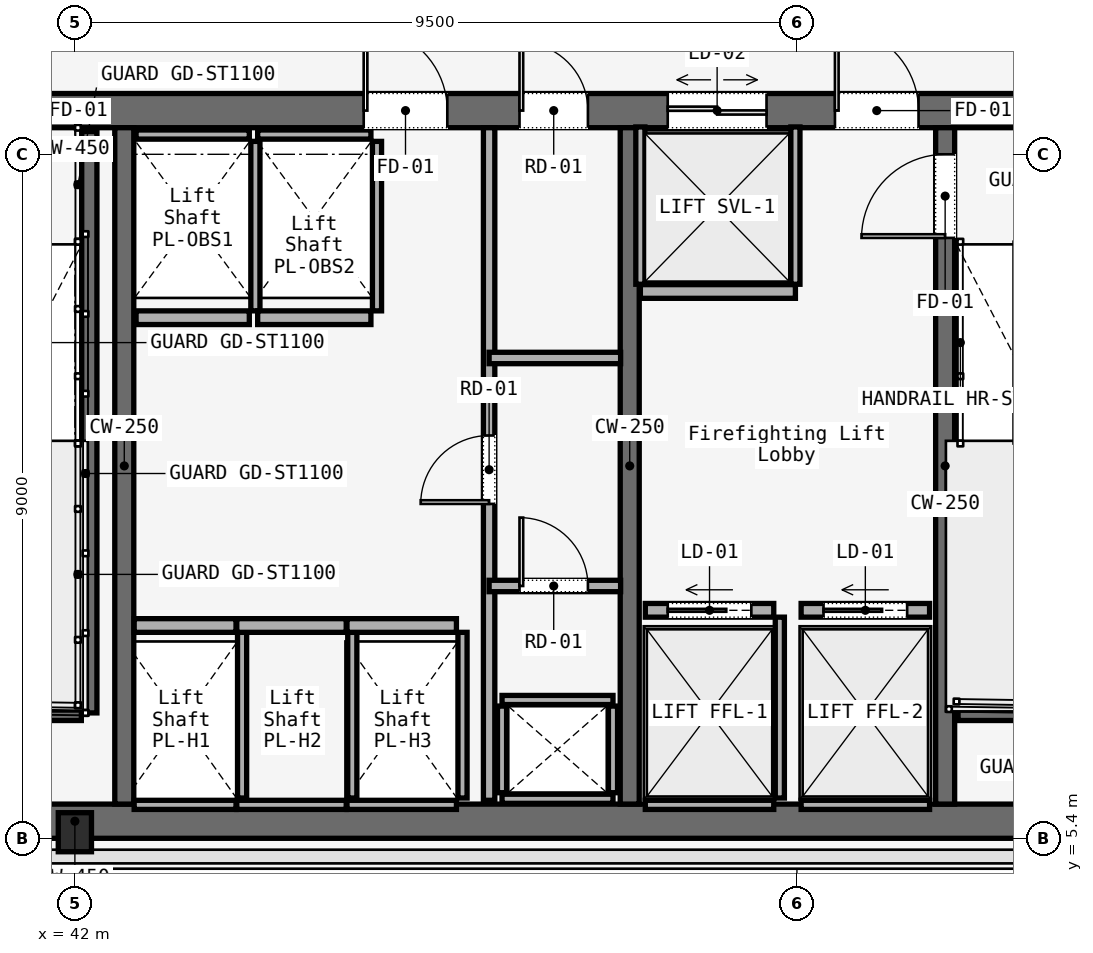
"""IFC4 building model, lengths in metres.
Left out: names, types, materials, properties, quantities, classifications, styles, units other than length and angle.
Written with IfcOpenShell. Run it as: python <this file> out.ifc"""

import sys

from ifc_helpers import new_model, si_unit, direction, frame, frame_2d, origin, origin_2d, place, context, subcontext, project, spatial, rectangle, i_section, extrude, element, fill, save


model = new_model("IFC4")
c1 = context("Model", 3, precision=1e-05, world=origin(), true_north=direction((0.0, 1.0)))
c2 = subcontext(c1, "Body", "Model", "MODEL_VIEW")
j1 = project(units=[si_unit("LENGTHUNIT", "METRE"), si_unit("PLANEANGLEUNIT", "RADIAN")], contexts=[c1])
p1 = place(None, origin())
s1 = spatial("IfcSite", under=j1, at=p1, CompositionType="ELEMENT")
p2 = place(p1, origin())
s2 = spatial("IfcBuilding", under=s1, at=p2, CompositionType="ELEMENT")
p3 = place(p2, frame((0.0, 0.0, 85.4)))
s3 = spatial("IfcBuildingStorey", under=s2, at=p3, CompositionType="ELEMENT", Elevation=85.4)
p4 = place(p3, frame((26.45, 14.975, 0.0), z_axis=(0.0, 0.0, 1.0), x_axis=(1.0, 0.0, 0.0)))
e1 = element("IfcWall", 1, at=p4, inside=s3, PredefinedType="SOLIDWALL", context=c2, shape_type="SweptSolid", body=[
    extrude(rectangle(XDim=31.1, YDim=0.45, at=frame_2d((15.55, 0.0))), origin(), (0.0, 0.0, 1.0), 3.58),
])
p5 = place(p4, frame((1.65, 0.0, 0.0)))
e2 = element("IfcOpeningElement", 2, at=p5, cuts=e1, PredefinedType="OPENING", context=c2, shape_type="SweptSolid", body=[
    extrude(rectangle(XDim=1.1, YDim=2.2, at=frame_2d((0.55, 1.1))), frame((0.0, 0.225, 0.0), z_axis=(0.0, -1.0, 0.0), x_axis=(1.0, 0.0, 0.0)), (0.0, 0.0, 1.0), 0.45),
])
p6 = place(p4, frame((13.65, 0.0, 0.0)))
e3 = element("IfcOpeningElement", 3, at=p6, cuts=e1, PredefinedType="OPENING", context=c2, shape_type="SweptSolid", body=[
    extrude(rectangle(XDim=1.1, YDim=2.2, at=frame_2d((0.55, 1.1))), frame((0.0, 0.225, 0.0), z_axis=(0.0, -1.0, 0.0), x_axis=(1.0, 0.0, 0.0)), (0.0, 0.0, 1.0), 0.45),
])
p7 = place(p4, frame((25.55, 0.0, 0.0)))
e4 = element("IfcOpeningElement", 4, at=p7, cuts=e1, PredefinedType="OPENING", context=c2, shape_type="SweptSolid", body=[
    extrude(rectangle(XDim=1.1, YDim=2.2, at=frame_2d((0.55, 1.1))), frame((0.0, 0.225, 0.0), z_axis=(0.0, -1.0, 0.0), x_axis=(1.0, 0.0, 0.0)), (0.0, 0.0, 1.0), 0.45),
])
p8 = place(p4, frame((10.7, 0.0, 0.0)))
e5 = element("IfcOpeningElement", 5, at=p8, cuts=e1, PredefinedType="OPENING", context=c2, shape_type="SweptSolid", body=[
    extrude(rectangle(XDim=1.4, YDim=2.2, at=frame_2d((0.7, 1.1))), frame((0.0, 0.225, 0.0), z_axis=(0.0, -1.0, 0.0), x_axis=(1.0, 0.0, 0.0)), (0.0, 0.0, 1.0), 0.45),
])
p9 = place(p4, frame((19.35, 0.0, 0.0)))
e6 = element("IfcOpeningElement", 6, at=p9, cuts=e1, PredefinedType="OPENING", context=c2, shape_type="SweptSolid", body=[
    extrude(rectangle(XDim=1.1, YDim=2.2, at=frame_2d((0.55, 1.1))), frame((0.0, 0.225, 0.0), z_axis=(0.0, -1.0, 0.0), x_axis=(1.0, 0.0, 0.0)), (0.0, 0.0, 1.0), 0.45),
])
p10 = place(p4, frame((21.4, 0.0, 0.0)))
e7 = element("IfcOpeningElement", 7, at=p10, cuts=e1, PredefinedType="OPENING", context=c2, shape_type="SweptSolid", body=[
    extrude(rectangle(XDim=0.9, YDim=2.1, at=frame_2d((0.45, 1.05))), frame((0.0, 0.225, 0.0), z_axis=(0.0, -1.0, 0.0), x_axis=(1.0, 0.0, 0.0)), (0.0, 0.0, 1.0), 0.45),
])
p11 = place(p4, frame((23.35, 0.0, 0.0)))
e8 = element("IfcOpeningElement", 8, at=p11, cuts=e1, PredefinedType="OPENING", context=c2, shape_type="SweptSolid", body=[
    extrude(rectangle(XDim=1.3, YDim=2.3, at=frame_2d((0.65, 1.15))), frame((0.0, 0.225, 0.0), z_axis=(0.0, -1.0, 0.0), x_axis=(1.0, 0.0, 0.0)), (0.0, 0.0, 1.0), 0.45),
])
p12 = place(p3, frame((26.45, 5.625, 0.0), z_axis=(0.0, 0.0, 1.0), x_axis=(1.0, 0.0, 0.0)))
e9 = element("IfcWall", 9, at=p12, inside=s3, PredefinedType="SOLIDWALL", context=c2, shape_type="SweptSolid", body=[
    extrude(rectangle(XDim=31.1, YDim=0.45, at=frame_2d((15.55, 0.0))), origin(), (0.0, 0.0, 1.0), 3.58),
])
for number, where, z_axis, x_axis in (
    (10, (42.65, 5.85, 0.0), (0.0, 0.0, 1.0), (0.0, 1.0, 0.0)),
    (11, (49.3, 5.85, 0.0), (0.0, 0.0, 1.0), (0.0, 1.0, 0.0)),
):
    element("IfcWall", number, at=place(p3, frame(where, z_axis=z_axis, x_axis=x_axis)), inside=s3, PredefinedType="SOLIDWALL", context=c2, shape_type="SweptSolid", body=[
        extrude(rectangle(XDim=8.9, YDim=0.25, at=frame_2d((4.45, 0.0))), origin(), (0.0, 0.0, 1.0), 3.58),
    ])
p13 = place(p3, frame((53.45, 5.85, 0.0), z_axis=(0.0, 0.0, 1.0), x_axis=(0.0, 1.0, 0.0)))
e12 = element("IfcWall", 12, at=p13, inside=s3, PredefinedType="SOLIDWALL", context=c2, shape_type="SweptSolid", body=[
    extrude(rectangle(XDim=8.9, YDim=0.25, at=frame_2d((4.45, 0.0))), origin(), (0.0, 0.0, 1.0), 3.58),
])
p14 = place(p13, frame((7.45, 0.0, 0.0)))
e13 = element("IfcOpeningElement", 13, at=p14, cuts=e12, PredefinedType="OPENING", context=c2, shape_type="SweptSolid", body=[
    extrude(rectangle(XDim=1.1, YDim=2.2, at=frame_2d((0.55, 1.1))), frame((0.0, 0.125, 0.0), z_axis=(0.0, -1.0, 0.0), x_axis=(1.0, 0.0, 0.0)), (0.0, 0.0, 1.0), 0.25),
])
p15 = place(p3, frame((42.0, 5.48, 0.0), z_axis=(0.0, 0.0, 1.0), x_axis=(1.0, 0.0, 0.0)))
e14 = element("IfcColumn", 14, at=p15, inside=s3, PredefinedType="COLUMN", context=c2, shape_type="SweptSolid", body=[
    extrude(i_section(OverallWidth=0.437, OverallDepth=0.514, WebThickness=0.061, FlangeThickness=0.077, FilletRadius=0.015, at=origin_2d()), origin(), (0.0, 0.0, 1.0), 3.58),
])
p16 = place(p3, frame((42.19, 14.7, 0.0), z_axis=(0.0, 0.0, 1.0), x_axis=(0.0, -1.0, 0.0)))
e15 = element("IfcWall", 15, at=p16, inside=s3, PredefinedType="SOLIDWALL", context=c2, shape_type="SweptSolid", body=[
    extrude(rectangle(XDim=7.65, YDim=0.2, at=frame_2d((3.825, 0.0))), origin(), (0.0, 0.0, 1.0), 3.8),
])
for number, where, z_axis, x_axis in (
    (16, (38.97, 7.05, 0.0), (0.0, 0.0, 1.0), (1.0, 0.0, 0.0)),
    (17, (53.62, 7.05, 0.0), (0.0, 0.0, 1.0), (1.0, 0.0, 0.0)),
):
    element("IfcWall", number, at=place(p3, frame(where, z_axis=z_axis, x_axis=x_axis)), inside=s3, PredefinedType="SOLIDWALL", context=c2, shape_type="SweptSolid", body=[
        extrude(rectangle(XDim=3.115, YDim=0.2, at=frame_2d((1.558, 0.0))), origin(), (0.0, 0.0, 1.0), 3.8),
    ])
for number, where, z_axis, x_axis in (
    (18, (47.62, 5.92, 0.0), (0.0, 0.0, 1.0), (1.0, 0.0, 0.0)),
    (19, (47.62, 7.22, 0.0), (0.0, 0.0, 1.0), (1.0, 0.0, 0.0)),
):
    element("IfcWall", number, at=place(p3, frame(where, z_axis=z_axis, x_axis=x_axis)), inside=s3, PredefinedType="SOLIDWALL", context=c2, shape_type="SweptSolid", body=[
        extrude(rectangle(XDim=1.46, YDim=0.12, at=frame_2d((0.73, 0.0))), origin(), (0.0, 0.0, 1.0), 2.95),
    ])
for number, where, z_axis, x_axis in (
    (20, (47.62, 6.0, 0.0), (0.0, 0.0, 1.0), (0.0, 1.0, 0.0)),
    (21, (49.08, 6.0, 0.0), (0.0, 0.0, 1.0), (0.0, 1.0, 0.0)),
):
    element("IfcWall", number, at=place(p3, frame(where, z_axis=z_axis, x_axis=x_axis)), inside=s3, PredefinedType="SOLIDWALL", context=c2, shape_type="SweptSolid", body=[
        extrude(rectangle(XDim=1.14, YDim=0.12, at=frame_2d((0.57, 0.0))), origin(), (0.0, 0.0, 1.0), 2.95),
    ])
p17 = place(p3, frame((47.45, 5.9, 0.0), z_axis=(0.0, 0.0, 1.0), x_axis=(0.0, 1.0, 0.0)))
e22 = element("IfcWall", 22, at=p17, inside=s3, PredefinedType="PARTITIONING", context=c2, shape_type="SweptSolid", body=[
    extrude(rectangle(XDim=8.85, YDim=0.15, at=frame_2d((4.425, 0.0))), origin(), (0.0, 0.0, 1.0), 2.95),
])
p18 = place(p17, frame((3.9, 0.0, 0.0)))
e23 = element("IfcOpeningElement", 23, at=p18, cuts=e22, PredefinedType="OPENING", context=c2, shape_type="SweptSolid", body=[
    extrude(rectangle(XDim=0.9, YDim=2.1, at=frame_2d((0.45, 1.05))), frame((0.0, 0.075, 0.0), z_axis=(0.0, -1.0, 0.0), x_axis=(1.0, 0.0, 0.0)), (0.0, 0.0, 1.0), 0.15),
])
p19 = place(p3, frame((47.45, 8.72, 0.0), z_axis=(0.0, 0.0, 1.0), x_axis=(1.0, 0.0, 0.0)))
e24 = element("IfcWall", 24, at=p19, inside=s3, PredefinedType="PARTITIONING", context=c2, shape_type="SweptSolid", body=[
    extrude(rectangle(XDim=1.73, YDim=0.15, at=frame_2d((0.865, 0.0))), origin(), (0.0, 0.0, 1.0), 2.95),
])
p20 = place(p19, frame((0.4, 0.0, 0.0)))
e25 = element("IfcOpeningElement", 25, at=p20, cuts=e24, PredefinedType="OPENING", context=c2, shape_type="SweptSolid", body=[
    extrude(rectangle(XDim=0.9, YDim=2.1, at=frame_2d((0.45, 1.05))), frame((0.0, 0.075, 0.0), z_axis=(0.0, -1.0, 0.0), x_axis=(1.0, 0.0, 0.0)), (0.0, 0.0, 1.0), 0.15),
])
p21 = place(p3, frame((47.45, 11.72, 0.0), z_axis=(0.0, 0.0, 1.0), x_axis=(1.0, 0.0, 0.0)))
e26 = element("IfcWall", 26, at=p21, inside=s3, PredefinedType="PARTITIONING", context=c2, shape_type="SweptSolid", body=[
    extrude(rectangle(XDim=1.73, YDim=0.15, at=frame_2d((0.865, 0.0))), origin(), (0.0, 0.0, 1.0), 2.95),
])
p22 = place(p3, frame((42.78, 8.2, 0.0), z_axis=(0.0, 0.0, 1.0), x_axis=(1.0, 0.0, 0.0)))
e27 = element("IfcWall", 27, at=p22, inside=s3, PredefinedType="SOLIDWALL", context=c2, shape_type="SweptSolid", body=[
    extrude(rectangle(XDim=1.34, YDim=0.18, at=frame_2d((0.67, 0.0))), origin(), (0.0, 0.0, 1.0), 2.95),
])
p23 = place(p3, frame((42.78, 5.84, 0.0), z_axis=(0.0, 0.0, 1.0), x_axis=(1.0, 0.0, 0.0)))
e28 = element("IfcWall", 28, at=p23, inside=s3, PredefinedType="SOLIDWALL", context=c2, shape_type="SweptSolid", body=[
    extrude(rectangle(XDim=1.34, YDim=0.12, at=frame_2d((0.67, 0.0))), origin(), (0.0, 0.0, 1.0), 2.95),
])
p24 = place(p3, frame((44.2, 5.93, 0.0), z_axis=(0.0, 0.0, 1.0), x_axis=(0.0, 1.0, 0.0)))
e29 = element("IfcWall", 29, at=p24, inside=s3, PredefinedType="SOLIDWALL", context=c2, shape_type="SweptSolid", body=[
    extrude(rectangle(XDim=2.18, YDim=0.12, at=frame_2d((1.09, 0.0))), origin(), (0.0, 0.0, 1.0), 2.95),
])
p25 = place(p3, frame((44.13, 8.2, 0.0), z_axis=(0.0, 0.0, 1.0), x_axis=(1.0, 0.0, 0.0)))
e30 = element("IfcWall", 30, at=p25, inside=s3, PredefinedType="SOLIDWALL", context=c2, shape_type="SweptSolid", body=[
    extrude(rectangle(XDim=1.44, YDim=0.18, at=frame_2d((0.72, 0.0))), origin(), (0.0, 0.0, 1.0), 2.95),
])
p26 = place(p3, frame((44.13, 5.84, 0.0), z_axis=(0.0, 0.0, 1.0), x_axis=(1.0, 0.0, 0.0)))
e31 = element("IfcWall", 31, at=p26, inside=s3, PredefinedType="SOLIDWALL", context=c2, shape_type="SweptSolid", body=[
    extrude(rectangle(XDim=1.44, YDim=0.12, at=frame_2d((0.72, 0.0))), origin(), (0.0, 0.0, 1.0), 2.95),
])
p27 = place(p3, frame((45.65, 5.93, 0.0), z_axis=(0.0, 0.0, 1.0), x_axis=(0.0, 1.0, 0.0)))
e32 = element("IfcWall", 32, at=p27, inside=s3, PredefinedType="SOLIDWALL", context=c2, shape_type="SweptSolid", body=[
    extrude(rectangle(XDim=2.18, YDim=0.12, at=frame_2d((1.09, 0.0))), origin(), (0.0, 0.0, 1.0), 2.95),
])
p28 = place(p3, frame((45.58, 8.2, 0.0), z_axis=(0.0, 0.0, 1.0), x_axis=(1.0, 0.0, 0.0)))
e33 = element("IfcWall", 33, at=p28, inside=s3, PredefinedType="SOLIDWALL", context=c2, shape_type="SweptSolid", body=[
    extrude(rectangle(XDim=1.44, YDim=0.18, at=frame_2d((0.72, 0.0))), origin(), (0.0, 0.0, 1.0), 2.95),
])
p29 = place(p3, frame((45.58, 5.84, 0.0), z_axis=(0.0, 0.0, 1.0), x_axis=(1.0, 0.0, 0.0)))
e34 = element("IfcWall", 34, at=p29, inside=s3, PredefinedType="SOLIDWALL", context=c2, shape_type="SweptSolid", body=[
    extrude(rectangle(XDim=1.44, YDim=0.12, at=frame_2d((0.72, 0.0))), origin(), (0.0, 0.0, 1.0), 2.95),
])
p30 = place(p3, frame((47.1, 5.93, 0.0), z_axis=(0.0, 0.0, 1.0), x_axis=(0.0, 1.0, 0.0)))
e35 = element("IfcWall", 35, at=p30, inside=s3, PredefinedType="SOLIDWALL", context=c2, shape_type="SweptSolid", body=[
    extrude(rectangle(XDim=2.18, YDim=0.12, at=frame_2d((1.09, 0.0))), origin(), (0.0, 0.0, 1.0), 2.95),
])
p31 = place(p3, frame((42.805, 12.25, 0.0), z_axis=(0.0, 0.0, 1.0), x_axis=(1.0, 0.0, 0.0)))
e36 = element("IfcWall", 36, at=p31, inside=s3, PredefinedType="SOLIDWALL", context=c2, shape_type="SweptSolid", body=[
    extrude(rectangle(XDim=1.49, YDim=0.18, at=frame_2d((0.745, 0.0))), origin(), (0.0, 0.0, 1.0), 2.95),
])
p32 = place(p3, frame((42.805, 14.66, 0.0), z_axis=(0.0, 0.0, 1.0), x_axis=(1.0, 0.0, 0.0)))
e37 = element("IfcWall", 37, at=p32, inside=s3, PredefinedType="SOLIDWALL", context=c2, shape_type="SweptSolid", body=[
    extrude(rectangle(XDim=1.49, YDim=0.12, at=frame_2d((0.745, 0.0))), origin(), (0.0, 0.0, 1.0), 2.95),
])
p33 = place(p3, frame((44.375, 12.34, 0.0), z_axis=(0.0, 0.0, 1.0), x_axis=(0.0, 1.0, 0.0)))
e38 = element("IfcWall", 38, at=p33, inside=s3, PredefinedType="SOLIDWALL", context=c2, shape_type="SweptSolid", body=[
    extrude(rectangle(XDim=2.23, YDim=0.12, at=frame_2d((1.115, 0.0))), origin(), (0.0, 0.0, 1.0), 2.95),
])
p34 = place(p3, frame((44.405, 12.25, 0.0), z_axis=(0.0, 0.0, 1.0), x_axis=(1.0, 0.0, 0.0)))
e39 = element("IfcWall", 39, at=p34, inside=s3, PredefinedType="SOLIDWALL", context=c2, shape_type="SweptSolid", body=[
    extrude(rectangle(XDim=1.49, YDim=0.18, at=frame_2d((0.745, 0.0))), origin(), (0.0, 0.0, 1.0), 2.95),
])
p35 = place(p3, frame((44.405, 14.66, 0.0), z_axis=(0.0, 0.0, 1.0), x_axis=(1.0, 0.0, 0.0)))
e40 = element("IfcWall", 40, at=p35, inside=s3, PredefinedType="SOLIDWALL", context=c2, shape_type="SweptSolid", body=[
    extrude(rectangle(XDim=1.49, YDim=0.12, at=frame_2d((0.745, 0.0))), origin(), (0.0, 0.0, 1.0), 2.95),
])
p36 = place(p3, frame((45.975, 12.34, 0.0), z_axis=(0.0, 0.0, 1.0), x_axis=(0.0, 1.0, 0.0)))
e41 = element("IfcWall", 41, at=p36, inside=s3, PredefinedType="SOLIDWALL", context=c2, shape_type="SweptSolid", body=[
    extrude(rectangle(XDim=2.23, YDim=0.12, at=frame_2d((1.115, 0.0))), origin(), (0.0, 0.0, 1.0), 2.95),
])
p37 = place(p3, frame((49.505, 8.4, 0.0), z_axis=(0.0, 0.0, 1.0), x_axis=(1.0, 0.0, 0.0)))
e42 = element("IfcWall", 42, at=p37, inside=s3, PredefinedType="SOLIDWALL", context=c2, shape_type="SweptSolid", body=[
    extrude(rectangle(XDim=1.69, YDim=0.18, at=frame_2d((0.845, 0.0))), origin(), (0.0, 0.0, 1.0), 2.95),
])
p38 = place(p37, frame((0.295, 0.0, 0.0)))
e43 = element("IfcOpeningElement", 43, at=p38, cuts=e42, PredefinedType="OPENING", context=c2, shape_type="SweptSolid", body=[
    extrude(rectangle(XDim=1.1, YDim=2.2, at=frame_2d((0.55, 1.1))), frame((0.0, 0.09, 0.0), z_axis=(0.0, -1.0, 0.0), x_axis=(1.0, 0.0, 0.0)), (0.0, 0.0, 1.0), 0.18),
])
p39 = place(p3, frame((49.505, 5.84, 0.0), z_axis=(0.0, 0.0, 1.0), x_axis=(1.0, 0.0, 0.0)))
e44 = element("IfcWall", 44, at=p39, inside=s3, PredefinedType="SOLIDWALL", context=c2, shape_type="SweptSolid", body=[
    extrude(rectangle(XDim=1.69, YDim=0.12, at=frame_2d((0.845, 0.0))), origin(), (0.0, 0.0, 1.0), 2.95),
])
p40 = place(p3, frame((51.275, 5.93, 0.0), z_axis=(0.0, 0.0, 1.0), x_axis=(0.0, 1.0, 0.0)))
e45 = element("IfcWall", 45, at=p40, inside=s3, PredefinedType="SOLIDWALL", context=c2, shape_type="SweptSolid", body=[
    extrude(rectangle(XDim=2.38, YDim=0.12, at=frame_2d((1.19, 0.0))), origin(), (0.0, 0.0, 1.0), 2.95),
])
p41 = place(p3, frame((51.555, 8.4, 0.0), z_axis=(0.0, 0.0, 1.0), x_axis=(1.0, 0.0, 0.0)))
e46 = element("IfcWall", 46, at=p41, inside=s3, PredefinedType="SOLIDWALL", context=c2, shape_type="SweptSolid", body=[
    extrude(rectangle(XDim=1.69, YDim=0.18, at=frame_2d((0.845, 0.0))), origin(), (0.0, 0.0, 1.0), 2.95),
])
p42 = place(p41, frame((0.295, 0.0, 0.0)))
e47 = element("IfcOpeningElement", 47, at=p42, cuts=e46, PredefinedType="OPENING", context=c2, shape_type="SweptSolid", body=[
    extrude(rectangle(XDim=1.1, YDim=2.2, at=frame_2d((0.55, 1.1))), frame((0.0, 0.09, 0.0), z_axis=(0.0, -1.0, 0.0), x_axis=(1.0, 0.0, 0.0)), (0.0, 0.0, 1.0), 0.18),
])
p43 = place(p3, frame((51.555, 5.84, 0.0), z_axis=(0.0, 0.0, 1.0), x_axis=(1.0, 0.0, 0.0)))
e48 = element("IfcWall", 48, at=p43, inside=s3, PredefinedType="SOLIDWALL", context=c2, shape_type="SweptSolid", body=[
    extrude(rectangle(XDim=1.69, YDim=0.12, at=frame_2d((0.845, 0.0))), origin(), (0.0, 0.0, 1.0), 2.95),
])
p44 = place(p3, frame((49.44, 12.595, 0.0), z_axis=(0.0, 0.0, 1.0), x_axis=(1.0, 0.0, 0.0)))
e49 = element("IfcWall", 49, at=p44, inside=s3, PredefinedType="SOLIDWALL", context=c2, shape_type="SweptSolid", body=[
    extrude(rectangle(XDim=2.04, YDim=0.18, at=frame_2d((1.02, 0.0))), origin(), (0.0, 0.0, 1.0), 2.95),
])
for number, where, z_axis, x_axis in (
    (50, (49.44, 12.69, 0.0), (0.0, 0.0, 1.0), (0.0, 1.0, 0.0)),
    (51, (51.48, 12.69, 0.0), (0.0, 0.0, 1.0), (0.0, 1.0, 0.0)),
):
    element("IfcWall", number, at=place(p3, frame(where, z_axis=z_axis, x_axis=x_axis)), inside=s3, PredefinedType="SOLIDWALL", context=c2, shape_type="SweptSolid", body=[
        extrude(rectangle(XDim=2.07, YDim=0.12, at=frame_2d((1.035, 0.0))), origin(), (0.0, 0.0, 1.0), 2.95),
    ])
p45 = place(p7, origin())
e52 = element("IfcDoor", 52, at=p45, inside=s3, OperationType="SINGLE_SWING_RIGHT", PredefinedType="DOOR", context=c2, shape_type="SweptSolid", body=[
    extrude(rectangle(XDim=1.1, YDim=2.2, at=frame_2d((0.55, 1.1))), frame((0.0, 0.025, 0.0), z_axis=(0.0, -1.0, 0.0), x_axis=(1.0, 0.0, 0.0)), (0.0, 0.0, 1.0), 0.05),
])
fill(e4, e52)
p46 = place(p9, origin())
e53 = element("IfcDoor", 53, at=p46, inside=s3, OperationType="SINGLE_SWING_LEFT", PredefinedType="DOOR", context=c2, shape_type="SweptSolid", body=[
    extrude(rectangle(XDim=1.1, YDim=2.2, at=frame_2d((0.55, 1.1))), frame((0.0, 0.025, 0.0), z_axis=(0.0, -1.0, 0.0), x_axis=(1.0, 0.0, 0.0)), (0.0, 0.0, 1.0), 0.05),
])
fill(e6, e53)
p47 = place(p10, origin())
e54 = element("IfcDoor", 54, at=p47, inside=s3, OperationType="SINGLE_SWING_LEFT", PredefinedType="DOOR", context=c2, shape_type="SweptSolid", body=[
    extrude(rectangle(XDim=0.9, YDim=2.1, at=frame_2d((0.45, 1.05))), frame((0.0, 0.025, 0.0), z_axis=(0.0, -1.0, 0.0), x_axis=(1.0, 0.0, 0.0)), (0.0, 0.0, 1.0), 0.05),
])
fill(e7, e54)
p48 = place(p14, origin())
e55 = element("IfcDoor", 55, at=p48, inside=s3, OperationType="SINGLE_SWING_LEFT", PredefinedType="DOOR", context=c2, shape_type="SweptSolid", body=[
    extrude(rectangle(XDim=1.1, YDim=2.2, at=frame_2d((0.55, 1.1))), frame((0.0, 0.025, 0.0), z_axis=(0.0, -1.0, 0.0), x_axis=(1.0, 0.0, 0.0)), (0.0, 0.0, 1.0), 0.05),
])
fill(e13, e55)
p49 = place(p18, origin())
e56 = element("IfcDoor", 56, at=p49, inside=s3, OperationType="SINGLE_SWING_LEFT", PredefinedType="DOOR", context=c2, shape_type="SweptSolid", body=[
    extrude(rectangle(XDim=0.9, YDim=2.1, at=frame_2d((0.45, 1.05))), frame((0.0, 0.025, 0.0), z_axis=(0.0, -1.0, 0.0), x_axis=(1.0, 0.0, 0.0)), (0.0, 0.0, 1.0), 0.05),
])
fill(e23, e56)
p50 = place(p20, origin())
e57 = element("IfcDoor", 57, at=p50, inside=s3, OperationType="SINGLE_SWING_RIGHT", PredefinedType="DOOR", context=c2, shape_type="SweptSolid", body=[
    extrude(rectangle(XDim=0.9, YDim=2.1, at=frame_2d((0.45, 1.05))), frame((0.0, 0.025, 0.0), z_axis=(0.0, -1.0, 0.0), x_axis=(1.0, 0.0, 0.0)), (0.0, 0.0, 1.0), 0.05),
])
fill(e25, e57)
p51 = place(p38, origin())
e58 = element("IfcDoor", 58, at=p51, inside=s3, OperationType="SLIDING_TO_LEFT", PredefinedType="DOOR", context=c2, shape_type="SweptSolid", body=[
    extrude(rectangle(XDim=1.1, YDim=2.2, at=frame_2d((0.55, 1.1))), frame((0.0, 0.025, 0.0), z_axis=(0.0, -1.0, 0.0), x_axis=(1.0, 0.0, 0.0)), (0.0, 0.0, 1.0), 0.05),
])
fill(e43, e58)
p52 = place(p42, origin())
e59 = element("IfcDoor", 59, at=p52, inside=s3, OperationType="SLIDING_TO_LEFT", PredefinedType="DOOR", context=c2, shape_type="SweptSolid", body=[
    extrude(rectangle(XDim=1.1, YDim=2.2, at=frame_2d((0.55, 1.1))), frame((0.0, 0.025, 0.0), z_axis=(0.0, -1.0, 0.0), x_axis=(1.0, 0.0, 0.0)), (0.0, 0.0, 1.0), 0.05),
])
fill(e47, e59)
p53 = place(p11, origin())
e60 = element("IfcDoor", 60, at=p53, inside=s3, OperationType="DOUBLE_DOOR_SLIDING", PredefinedType="DOOR", context=c2, shape_type="SweptSolid", body=[
    extrude(rectangle(XDim=1.3, YDim=2.3, at=frame_2d((0.65, 1.15))), frame((0.0, 0.025, 0.0), z_axis=(0.0, -1.0, 0.0), x_axis=(1.0, 0.0, 0.0)), (0.0, 0.0, 1.0), 0.05),
])
fill(e8, e60)
save(model, sys.argv[1])
